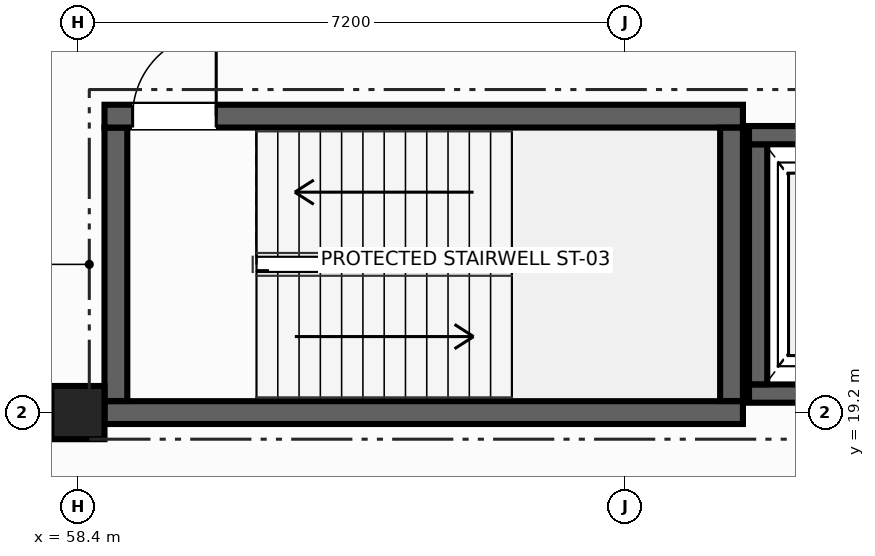
"""IFC4 building model, lengths in metres.
Left out: names, types, materials, properties, quantities, classifications, styles, units other than length and angle.
Written with IfcOpenShell. Run it as: python <this file> out.ifc"""

import sys

from ifc_helpers import new_model, si_unit, direction, frame, frame_2d, origin, origin_2d, place, context, subcontext, project, spatial, rectangle, extrude, element, fill, save


model = new_model("IFC4")
c1 = context("Model", 3, precision=1e-05, world=origin(), true_north=direction((0.0, 1.0)))
c2 = subcontext(c1, "Body", "Model", "MODEL_VIEW")
j1 = project(units=[si_unit("LENGTHUNIT", "METRE"), si_unit("PLANEANGLEUNIT", "RADIAN")], contexts=[c1])
p1 = place(None, origin())
s1 = spatial("IfcSite", under=j1, at=p1, CompositionType="ELEMENT")
p2 = place(p1, origin())
s2 = spatial("IfcBuilding", under=s1, at=p2, CompositionType="ELEMENT")
p3 = place(p2, frame((0.0, 0.0, 5.4)))
s3 = spatial("IfcBuildingStorey", under=s2, at=p3, CompositionType="ELEMENT", Elevation=5.4)
p4 = place(p3, frame((58.4, 19.2, 0.0), z_axis=(0.0, 0.0, 1.0), x_axis=(0.0, 1.0, 0.0)))
e1 = element("IfcColumn", 1, at=p4, inside=s3, PredefinedType="COLUMN", context=c2, shape_type="SweptSolid", body=[
    extrude(rectangle(XDim=0.7, YDim=0.7, at=origin_2d()), origin(), (0.0, 0.0, 1.0), 4.5),
])
p5 = place(p3, frame((67.15, 19.2, 0.0), z_axis=(0.0, 0.0, 1.0), x_axis=(-1.0, 0.0, 0.0)))
e2 = element("IfcWall", 2, at=p5, inside=s3, PredefinedType="SHEAR", context=c2, shape_type="SweptSolid", body=[
    extrude(rectangle(XDim=8.4, YDim=0.3, at=frame_2d((4.2, 0.0))), origin(), (0.0, 0.0, 1.0), 4.22),
])
p6 = place(p3, frame((58.9, 19.352, 0.0), z_axis=(0.0, 0.0, 1.0), x_axis=(0.0, 1.0, 0.0)))
e3 = element("IfcWall", 3, at=p6, inside=s3, PredefinedType="SHEAR", context=c2, shape_type="SweptSolid", body=[
    extrude(rectangle(XDim=3.598, YDim=0.3, at=frame_2d((1.799, 0.0))), origin(), (0.0, 0.0, 1.0), 4.22),
])
p7 = place(p3, frame((58.75, 23.1, 0.0), z_axis=(0.0, 0.0, 1.0), x_axis=(1.0, 0.0, 0.0)))
e4 = element("IfcWall", 4, at=p7, inside=s3, PredefinedType="SHEAR", context=c2, shape_type="SweptSolid", body=[
    extrude(rectangle(XDim=8.4, YDim=0.3, at=frame_2d((4.2, 0.0))), origin(), (0.0, 0.0, 1.0), 4.22),
])
p8 = place(p7, frame((0.37, 0.0, 0.0)))
e5 = element("IfcOpeningElement", 5, at=p8, cuts=e4, PredefinedType="OPENING", context=c2, shape_type="SweptSolid", body=[
    extrude(rectangle(XDim=1.1, YDim=2.15, at=frame_2d((0.55, 1.075))), frame((0.0, 0.16, 0.0), z_axis=(0.0, -1.0, 0.0), x_axis=(1.0, 0.0, 0.0)), (0.0, 0.0, 1.0), 0.32),
])
p9 = place(p3, frame((67.0, 22.948, 0.0), z_axis=(0.0, 0.0, 1.0), x_axis=(0.0, -1.0, 0.0)))
e6 = element("IfcWall", 6, at=p9, inside=s3, PredefinedType="SHEAR", context=c2, shape_type="SweptSolid", body=[
    extrude(rectangle(XDim=3.596, YDim=0.3, at=frame_2d((1.798, 0.0))), origin(), (0.0, 0.0, 1.0), 4.22),
])
p10 = place(p3, frame((70.07, 19.45, 0.0), z_axis=(0.0, 0.0, 1.0), x_axis=(-1.0, 0.0, 0.0)))
e7 = element("IfcWall", 7, at=p10, inside=s3, PredefinedType="SHEAR", context=c2, shape_type="SweptSolid", body=[
    extrude(rectangle(XDim=2.84, YDim=0.24, at=frame_2d((1.42, 0.0))), origin(), (0.0, 0.0, 1.0), 4.22),
])
p11 = place(p3, frame((67.35, 19.572, 0.0), z_axis=(0.0, 0.0, 1.0), x_axis=(0.0, 1.0, 0.0)))
e8 = element("IfcWall", 8, at=p11, inside=s3, PredefinedType="SHEAR", context=c2, shape_type="SweptSolid", body=[
    extrude(rectangle(XDim=3.158, YDim=0.24, at=frame_2d((1.579, 0.0))), origin(), (0.0, 0.0, 1.0), 4.22),
])
p12 = place(p3, frame((67.23, 22.85, 0.0), z_axis=(0.0, 0.0, 1.0), x_axis=(1.0, 0.0, 0.0)))
e9 = element("IfcWall", 9, at=p12, inside=s3, PredefinedType="SHEAR", context=c2, shape_type="SweptSolid", body=[
    extrude(rectangle(XDim=2.84, YDim=0.24, at=frame_2d((1.42, 0.0))), origin(), (0.0, 0.0, 1.0), 4.22),
])
p13 = place(p12, frame((0.82, 0.0, 0.0)))
e10 = element("IfcOpeningElement", 10, at=p13, cuts=e9, PredefinedType="OPENING", context=c2, shape_type="SweptSolid", body=[
    extrude(rectangle(XDim=1.2, YDim=2.15, at=frame_2d((0.6, 1.075))), frame((0.0, 0.13, 0.0), z_axis=(0.0, -1.0, 0.0), x_axis=(1.0, 0.0, 0.0)), (0.0, 0.0, 1.0), 0.26),
])
p14 = place(p8, origin())
e11 = element("IfcDoor", 11, at=p14, inside=s3, OperationType="SINGLE_SWING_RIGHT", PredefinedType="DOOR", context=c2, shape_type="SweptSolid", body=[
    extrude(rectangle(XDim=1.1, YDim=2.15, at=frame_2d((0.55, 1.075))), frame((0.0, 0.025, 0.0), z_axis=(0.0, -1.0, 0.0), x_axis=(1.0, 0.0, 0.0)), (0.0, 0.0, 1.0), 0.05),
])
fill(e5, e11)
save(model, sys.argv[1])
